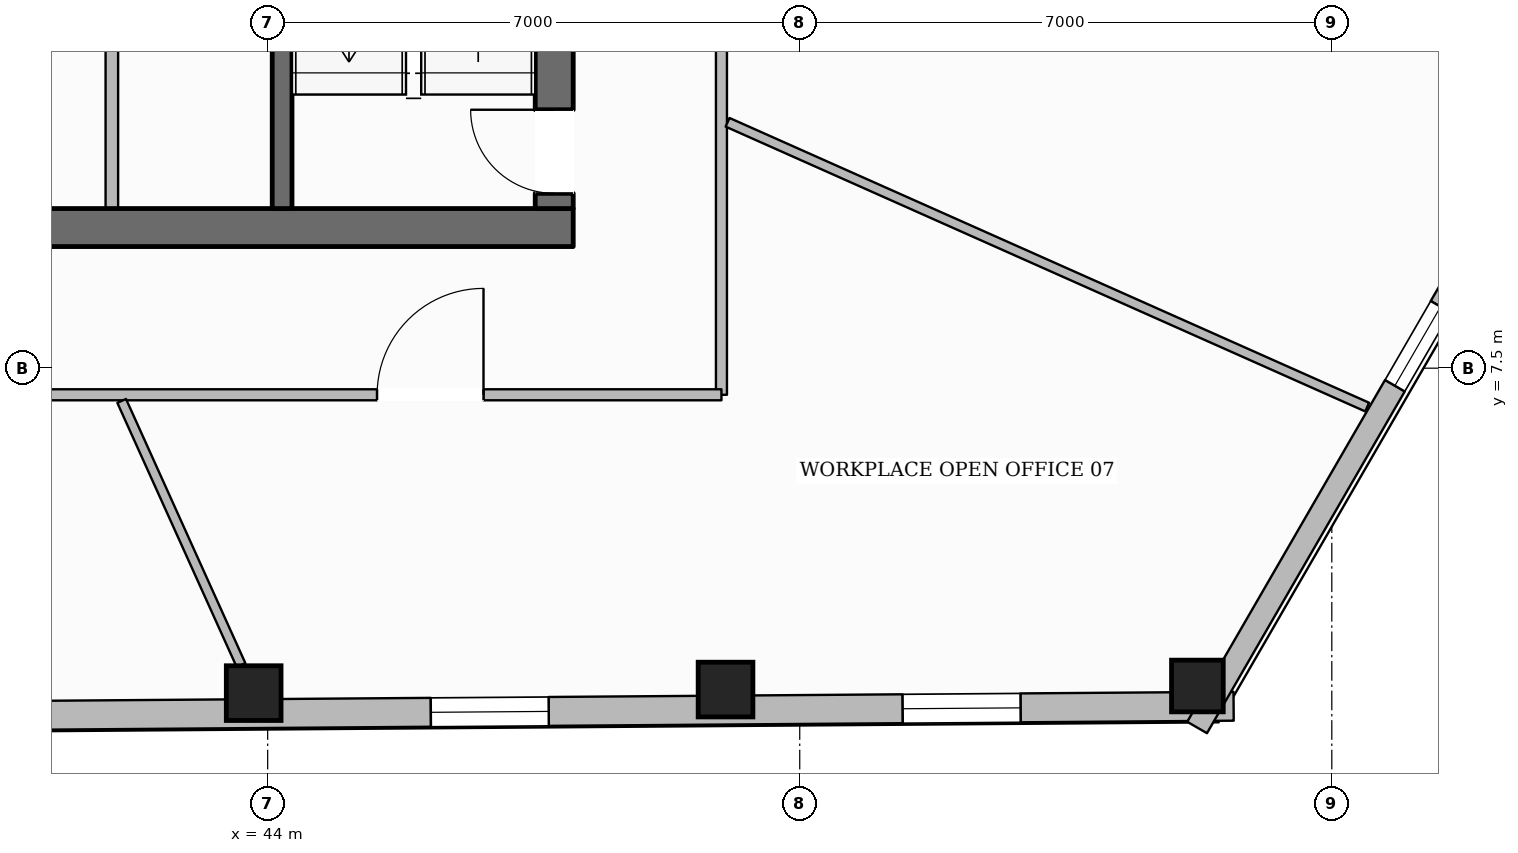
"""IFC4 building model, lengths in metres.
Left out: names, types, materials, properties, quantities, classifications, styles, units other than length and angle.
Written with IfcOpenShell. Run it as: python <this file> out.ifc"""

import sys

from ifc_helpers import new_model, si_unit, direction, frame, frame_2d, origin, origin_2d, place, context, subcontext, project, spatial, rectangle, hollow_rectangle, extrude, element, fill, save


model = new_model("IFC4")
c1 = context("Model", 3, precision=1e-05, world=origin(), true_north=direction((0.0, 1.0)))
c2 = subcontext(c1, "Body", "Model", "MODEL_VIEW")
j1 = project(units=[si_unit("LENGTHUNIT", "METRE"), si_unit("PLANEANGLEUNIT", "RADIAN")], contexts=[c1])
p1 = place(None, origin())
s1 = spatial("IfcSite", under=j1, at=p1, CompositionType="ELEMENT")
p2 = place(p1, origin())
s2 = spatial("IfcBuilding", under=s1, at=p2, CompositionType="ELEMENT")
p3 = place(p2, frame((0.0, 0.0, 150.95)))
s3 = spatial("IfcBuildingStorey", under=s2, at=p3, CompositionType="ELEMENT", Elevation=150.95)
p4 = place(p3, frame((27.98, 9.35, 0.0), z_axis=(0.0, 0.0, 1.0), x_axis=(1.0, 0.0, 0.0)))
e1 = element("IfcWall", 1, at=p4, inside=s3, PredefinedType="SOLIDWALL", context=c2, shape_type="SweptSolid", body=[
    extrude(rectangle(XDim=20.04, YDim=0.5, at=frame_2d((10.02, 0.0))), origin(), (0.0, 0.0, 1.0), 3.43),
])
p5 = place(p4, frame((10.52, 0.0, 0.0)))
e2 = element("IfcOpeningElement", 2, at=p5, cuts=e1, PredefinedType="OPENING", context=c2, shape_type="SweptSolid", body=[
    extrude(rectangle(XDim=1.4, YDim=2.2, at=frame_2d((0.7, 1.1))), frame((0.0, 0.26, 0.0), z_axis=(0.0, -1.0, 0.0), x_axis=(1.0, 0.0, 0.0)), (0.0, 0.0, 1.0), 0.52),
])
p6 = place(p3, frame((47.77, 9.6, 0.0), z_axis=(0.0, 0.0, 1.0), x_axis=(0.0, 1.0, 0.0)))
e3 = element("IfcWall", 3, at=p6, inside=s3, PredefinedType="SOLIDWALL", context=c2, shape_type="SweptSolid", body=[
    extrude(rectangle(XDim=13.0, YDim=0.5, at=frame_2d((6.5, 0.0))), origin(), (0.0, 0.0, 1.0), 3.43),
])
p7 = place(p6, frame((0.2, 0.0, 0.0)))
e4 = element("IfcOpeningElement", 4, at=p7, cuts=e3, PredefinedType="OPENING", context=c2, shape_type="SweptSolid", body=[
    extrude(rectangle(XDim=1.1, YDim=2.15, at=frame_2d((0.55, 1.075))), frame((0.0, 0.26, 0.0), z_axis=(0.0, -1.0, 0.0), x_axis=(1.0, 0.0, 0.0)), (0.0, 0.0, 1.0), 0.52),
])
p8 = place(p6, frame((8.4, 0.0, 0.0)))
e5 = element("IfcOpeningElement", 5, at=p8, cuts=e3, PredefinedType="OPENING", context=c2, shape_type="SweptSolid", body=[
    extrude(rectangle(XDim=0.9, YDim=2.1, at=frame_2d((0.45, 1.05))), frame((0.0, 0.26, 0.0), z_axis=(0.0, -1.0, 0.0), x_axis=(1.0, 0.0, 0.0)), (0.0, 0.0, 1.0), 0.52),
])
p9 = place(p3, frame((44.19, 9.6, 0.0), z_axis=(0.0, 0.0, 1.0), x_axis=(0.0, 1.0, 0.0)))
e6 = element("IfcWall", 6, at=p9, inside=s3, PredefinedType="SHEAR", context=c2, shape_type="SweptSolid", body=[
    extrude(rectangle(XDim=13.0, YDim=0.26, at=frame_2d((6.5, 0.0))), origin(), (0.0, 0.0, 1.0), 3.43),
])
p10 = place(p9, frame((10.925, 0.0, 0.0)))
e7 = element("IfcOpeningElement", 7, at=p10, cuts=e6, PredefinedType="OPENING", context=c2, shape_type="SweptSolid", body=[
    extrude(rectangle(XDim=1.25, YDim=2.25, at=frame_2d((0.625, 1.125))), frame((0.0, 0.14, 0.0), z_axis=(0.0, -1.0, 0.0), x_axis=(1.0, 0.0, 0.0)), (0.0, 0.0, 1.0), 0.28),
])
for number, where, z_axis, x_axis in (
    (8, (43.816, 3.225, 0.0), (0.0, 0.0, 1.0), (1.0, 0.0, 0.0)),
    (9, (50.024, 3.272, 0.0), (0.0, 0.0, 1.0), (1.0, 0.0, 0.0)),
):
    element("IfcColumn", number, at=place(p3, frame(where, z_axis=z_axis, x_axis=x_axis)), inside=s3, PredefinedType="COLUMN", context=c2, shape_type="SweptSolid", body=[
        extrude(hollow_rectangle(XDim=0.72, YDim=0.72, WallThickness=0.032, at=origin_2d()), origin(), (0.0, 0.0, 1.0), 3.43),
    ])
p11 = place(p3, frame((56.232, 3.319, 0.0), z_axis=(0.0, 0.0, 1.0), x_axis=(1.0, 0.0, 0.0)))
e10 = element("IfcColumn", 10, at=p11, inside=s3, PredefinedType="COLUMN", context=c2, shape_type="SweptSolid", body=[
    extrude(hollow_rectangle(XDim=0.68, YDim=0.68, WallThickness=0.03, at=origin_2d()), origin(), (0.0, 0.0, 1.0), 3.43),
])
p12 = place(p3, frame((56.708, 3.052, 0.0), z_axis=(0.0, 0.0, 1.0), x_axis=(-0.999971472173, -0.007553465491, 0.0)))
e11 = element("IfcWall", 11, at=p12, inside=s3, PredefinedType="STANDARD", context=c2, shape_type="SweptSolid", body=[
    extrude(rectangle(XDim=38.204, YDim=0.38, at=frame_2d((19.102, 0.0))), origin(), (0.0, 0.0, 1.0), 2.889),
])
p13 = place(p12, frame((33.844, 0.0, 0.55)))
e12 = element("IfcOpeningElement", 12, at=p13, cuts=e11, PredefinedType="OPENING", context=c2, shape_type="SweptSolid", body=[
    extrude(rectangle(XDim=1.55, YDim=1.6, at=frame_2d((0.775, 0.8))), frame((0.0, 0.2, 0.0), z_axis=(0.0, -1.0, 0.0), x_axis=(1.0, 0.0, 0.0)), (0.0, 0.0, 1.0), 0.4),
])
p14 = place(p12, frame((27.635, 0.0, 0.55)))
e13 = element("IfcOpeningElement", 13, at=p14, cuts=e11, PredefinedType="OPENING", context=c2, shape_type="SweptSolid", body=[
    extrude(rectangle(XDim=1.55, YDim=1.6, at=frame_2d((0.775, 0.8))), frame((0.0, 0.2, 0.0), z_axis=(0.0, -1.0, 0.0), x_axis=(1.0, 0.0, 0.0)), (0.0, 0.0, 1.0), 0.4),
])
p15 = place(p12, frame((21.427, 0.0, 0.55)))
e14 = element("IfcOpeningElement", 14, at=p15, cuts=e11, PredefinedType="OPENING", context=c2, shape_type="SweptSolid", body=[
    extrude(rectangle(XDim=1.55, YDim=1.6, at=frame_2d((0.775, 0.8))), frame((0.0, 0.2, 0.0), z_axis=(0.0, -1.0, 0.0), x_axis=(1.0, 0.0, 0.0)), (0.0, 0.0, 1.0), 0.4),
])
p16 = place(p12, frame((9.011, 0.0, 0.55)))
e15 = element("IfcOpeningElement", 15, at=p16, cuts=e11, PredefinedType="OPENING", context=c2, shape_type="SweptSolid", body=[
    extrude(rectangle(XDim=1.55, YDim=1.6, at=frame_2d((0.775, 0.8))), frame((0.0, 0.2, 0.0), z_axis=(0.0, -1.0, 0.0), x_axis=(1.0, 0.0, 0.0)), (0.0, 0.0, 1.0), 0.4),
])
p17 = place(p12, frame((2.803, 0.0, 0.55)))
e16 = element("IfcOpeningElement", 16, at=p17, cuts=e11, PredefinedType="OPENING", context=c2, shape_type="SweptSolid", body=[
    extrude(rectangle(XDim=1.55, YDim=1.6, at=frame_2d((0.775, 0.8))), frame((0.0, 0.2, 0.0), z_axis=(0.0, -1.0, 0.0), x_axis=(1.0, 0.0, 0.0)), (0.0, 0.0, 1.0), 0.4),
])
p18 = place(p3, frame((62.033, 12.804, 0.0), z_axis=(0.0, 0.0, 1.0), x_axis=(-0.500904242639, -0.865502709243, 0.0)))
e17 = element("IfcWall", 17, at=p18, inside=s3, PredefinedType="STANDARD", context=c2, shape_type="SweptSolid", body=[
    extrude(rectangle(XDim=11.59, YDim=0.3, at=frame_2d((5.795, 0.0))), origin(), (0.0, 0.0, 1.0), 2.889),
])
p19 = place(p18, frame((5.195, 0.0, 0.65)))
e18 = element("IfcOpeningElement", 18, at=p19, cuts=e17, PredefinedType="OPENING", context=c2, shape_type="SweptSolid", body=[
    extrude(rectangle(XDim=1.2, YDim=1.55, at=frame_2d((0.6, 0.775))), frame((0.0, 0.16, 0.0), z_axis=(0.0, -1.0, 0.0), x_axis=(1.0, 0.0, 0.0)), (0.0, 0.0, 1.0), 0.32),
])
p20 = place(p3, frame((41.95, 9.55, 0.0), z_axis=(0.0, 0.0, 1.0), x_axis=(0.0, 1.0, 0.0)))
e19 = element("IfcWall", 19, at=p20, inside=s3, PredefinedType="PARTITIONING", context=c2, shape_type="SweptSolid", body=[
    extrude(rectangle(XDim=2.29, YDim=0.165, at=frame_2d((1.145, 0.0))), origin(), (0.0, 0.0, 1.0), 3.43),
])
p21 = place(p3, frame((49.97, 7.15, 0.0), z_axis=(0.0, 0.0, 1.0), x_axis=(0.0, 1.0, 0.0)))
e20 = element("IfcWall", 20, at=p21, inside=s3, PredefinedType="PARTITIONING", context=c2, shape_type="SweptSolid", body=[
    extrude(rectangle(XDim=17.9, YDim=0.145, at=frame_2d((8.95, 0.0))), origin(), (0.0, 0.0, 1.0), 3.118),
])
p22 = place(p21, frame((8.246, 0.0, 0.0)))
e21 = element("IfcOpeningElement", 21, at=p22, cuts=e20, PredefinedType="OPENING", context=c2, shape_type="SweptSolid", body=[
    extrude(rectangle(XDim=1.02, YDim=2.15, at=frame_2d((0.51, 1.075))), frame((0.0, 0.083, 0.0), z_axis=(0.0, -1.0, 0.0), x_axis=(1.0, 0.0, 0.0)), (0.0, 0.0, 1.0), 0.165),
])
p23 = place(p3, frame((26.03, 7.15, 0.0), z_axis=(0.0, 0.0, 1.0), x_axis=(1.0, 0.0, 0.0)))
e22 = element("IfcWall", 22, at=p23, inside=s3, PredefinedType="PARTITIONING", context=c2, shape_type="SweptSolid", body=[
    extrude(rectangle(XDim=23.94, YDim=0.145, at=frame_2d((11.97, 0.0))), origin(), (0.0, 0.0, 1.0), 3.43),
])
p24 = place(p23, frame((4.53, 0.0, 0.0)))
e23 = element("IfcOpeningElement", 23, at=p24, cuts=e22, PredefinedType="OPENING", context=c2, shape_type="SweptSolid", body=[
    extrude(rectangle(XDim=0.88, YDim=2.1, at=frame_2d((0.44, 1.05))), frame((0.0, 0.083, 0.0), z_axis=(0.0, -1.0, 0.0), x_axis=(1.0, 0.0, 0.0)), (0.0, 0.0, 1.0), 0.165),
])
p25 = place(p23, frame((7.05, 0.0, 0.0)))
e24 = element("IfcOpeningElement", 24, at=p25, cuts=e22, PredefinedType="OPENING", context=c2, shape_type="SweptSolid", body=[
    extrude(rectangle(XDim=0.88, YDim=2.1, at=frame_2d((0.44, 1.05))), frame((0.0, 0.083, 0.0), z_axis=(0.0, -1.0, 0.0), x_axis=(1.0, 0.0, 0.0)), (0.0, 0.0, 1.0), 0.165),
])
p26 = place(p23, frame((9.43, 0.0, 0.0)))
e25 = element("IfcOpeningElement", 25, at=p26, cuts=e22, PredefinedType="OPENING", context=c2, shape_type="SweptSolid", body=[
    extrude(rectangle(XDim=0.96, YDim=2.1, at=frame_2d((0.48, 1.05))), frame((0.0, 0.083, 0.0), z_axis=(0.0, -1.0, 0.0), x_axis=(1.0, 0.0, 0.0)), (0.0, 0.0, 1.0), 0.165),
])
p27 = place(p23, frame((13.062, 0.0, 0.0)))
e26 = element("IfcOpeningElement", 26, at=p27, cuts=e22, PredefinedType="OPENING", context=c2, shape_type="SweptSolid", body=[
    extrude(rectangle(XDim=0.98, YDim=2.15, at=frame_2d((0.49, 1.075))), frame((0.0, 0.083, 0.0), z_axis=(0.0, -1.0, 0.0), x_axis=(1.0, 0.0, 0.0)), (0.0, 0.0, 1.0), 0.165),
])
p28 = place(p23, frame((19.41, 0.0, 0.0)))
e27 = element("IfcOpeningElement", 27, at=p28, cuts=e22, PredefinedType="OPENING", context=c2, shape_type="SweptSolid", body=[
    extrude(rectangle(XDim=1.4, YDim=2.2, at=frame_2d((0.7, 1.1))), frame((0.0, 0.083, 0.0), z_axis=(0.0, -1.0, 0.0), x_axis=(1.0, 0.0, 0.0)), (0.0, 0.0, 1.0), 0.165),
])
p29 = place(p3, frame((42.079, 7.07, 0.0), z_axis=(0.0, 0.0, 1.0), x_axis=(0.411694746123, -0.911321807056, 0.0)))
e28 = element("IfcWall", 28, at=p29, inside=s3, PredefinedType="PARTITIONING", context=c2, shape_type="SweptSolid", body=[
    extrude(rectangle(XDim=3.815, YDim=0.125, at=frame_2d((1.907, 0.0))), origin(), (0.0, 0.0, 1.0), 3.43),
])
p30 = place(p3, frame((50.051, 10.735, 0.0), z_axis=(0.0, 0.0, 1.0), x_axis=(0.913538089358, -0.406753192111, 0.0)))
e29 = element("IfcWall", 29, at=p30, inside=s3, PredefinedType="PARTITIONING", context=c2, shape_type="SweptSolid", body=[
    extrude(rectangle(XDim=9.211, YDim=0.125, at=frame_2d((4.605, 0.0))), origin(), (0.0, 0.0, 1.0), 3.43),
])
p31 = place(p16, origin())
e30 = element("IfcWindow", 30, at=p31, inside=s3, PartitioningType="SINGLE_PANEL", PredefinedType="WINDOW", context=c2, shape_type="SweptSolid", body=[
    extrude(rectangle(XDim=1.55, YDim=1.6, at=frame_2d((0.775, 0.8))), frame((0.0, 0.03, 0.0), z_axis=(0.0, -1.0, 0.0), x_axis=(1.0, 0.0, 0.0)), (0.0, 0.0, 1.0), 0.06),
])
fill(e15, e30)
p32 = place(p17, origin())
e31 = element("IfcWindow", 31, at=p32, inside=s3, PartitioningType="SINGLE_PANEL", PredefinedType="WINDOW", context=c2, shape_type="SweptSolid", body=[
    extrude(rectangle(XDim=1.55, YDim=1.6, at=frame_2d((0.775, 0.8))), frame((0.0, 0.03, 0.0), z_axis=(0.0, -1.0, 0.0), x_axis=(1.0, 0.0, 0.0)), (0.0, 0.0, 1.0), 0.06),
])
fill(e16, e31)
p33 = place(p19, origin())
e32 = element("IfcWindow", 32, at=p33, inside=s3, PartitioningType="SINGLE_PANEL", PredefinedType="WINDOW", context=c2, shape_type="SweptSolid", body=[
    extrude(rectangle(XDim=1.2, YDim=1.55, at=frame_2d((0.6, 0.775))), frame((0.0, 0.03, 0.0), z_axis=(0.0, -1.0, 0.0), x_axis=(1.0, 0.0, 0.0)), (0.0, 0.0, 1.0), 0.06),
])
fill(e18, e32)
p34 = place(p7, origin())
e33 = element("IfcDoor", 33, at=p34, inside=s3, OperationType="SINGLE_SWING_RIGHT", PredefinedType="DOOR", context=c2, shape_type="SweptSolid", body=[
    extrude(rectangle(XDim=1.1, YDim=2.15, at=frame_2d((0.55, 1.075))), frame((0.0, 0.025, 0.0), z_axis=(0.0, -1.0, 0.0), x_axis=(1.0, 0.0, 0.0)), (0.0, 0.0, 1.0), 0.05),
])
fill(e4, e33)
p35 = place(p28, origin())
e34 = element("IfcDoor", 34, at=p35, inside=s3, OperationType="SINGLE_SWING_RIGHT", PredefinedType="DOOR", context=c2, shape_type="SweptSolid", body=[
    extrude(rectangle(XDim=1.4, YDim=2.2, at=frame_2d((0.7, 1.1))), frame((0.0, 0.025, 0.0), z_axis=(0.0, -1.0, 0.0), x_axis=(1.0, 0.0, 0.0)), (0.0, 0.0, 1.0), 0.05),
])
fill(e27, e34)
save(model, sys.argv[1])
